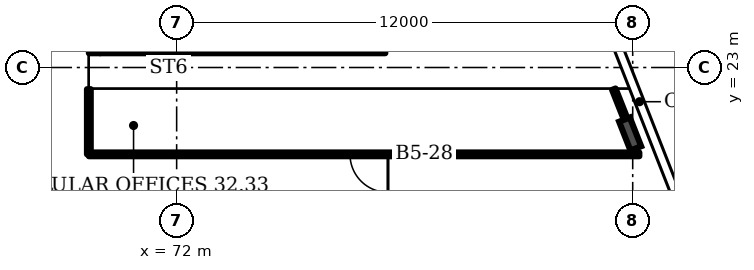
"""IFC4 building model, lengths in metres.
Left out: names, types, materials, properties, quantities, classifications, styles, units other than length and angle.
Written with IfcOpenShell. Run it as: python <this file> out.ifc"""

import sys

from ifc_helpers import new_model, si_unit, direction, frame, frame_2d, origin, origin_2d, place, context, subcontext, project, spatial, rectangle, i_section, extrude, element, fill, save


model = new_model("IFC4")
c1 = context("Model", 3, precision=1e-05, world=origin(), true_north=direction((0.0, 1.0)))
c2 = subcontext(c1, "Body", "Model", "MODEL_VIEW")
j1 = project(units=[si_unit("LENGTHUNIT", "METRE"), si_unit("PLANEANGLEUNIT", "RADIAN")], contexts=[c1])
p1 = place(None, origin())
s1 = spatial("IfcSite", under=j1, at=p1, CompositionType="ELEMENT")
p2 = place(p1, origin())
s2 = spatial("IfcBuilding", under=s1, at=p2, CompositionType="ELEMENT")
p3 = place(p2, frame((0.0, 0.0, 136.3)))
s3 = spatial("IfcBuildingStorey", under=s2, at=p3, CompositionType="ELEMENT", Elevation=136.3)
p4 = place(p3, frame((83.933, 21.251, 0.0), z_axis=(0.0, 0.0, 1.0), x_axis=(0.930702, 0.365778, 0.0)))
e1 = element("IfcColumn", 1, at=p4, inside=s3, PredefinedType="COLUMN", context=c2, shape_type="SweptSolid", body=[
    extrude(i_section(OverallWidth=0.303, OverallDepth=0.814, WebThickness=0.021, FlangeThickness=0.04, FilletRadius=0.03, at=origin_2d()), origin(), (0.0, 0.0, 1.0), 3.6),
])
p5 = place(p3, frame((69.84, 23.375, 0.0), z_axis=(0.0, 0.0, 1.0), x_axis=(0.0, 1.0, 0.0)))
e2 = element("IfcWall", 2, at=p5, inside=s3, PredefinedType="SHEAR", context=c2, shape_type="SweptSolid", body=[
    extrude(rectangle(XDim=4.35, YDim=0.3, at=frame_2d((2.175, 0.0))), origin(), (0.0, 0.0, 1.0), 3.2),
])
p6 = place(p5, frame((1.575, 0.0, 0.0)))
e3 = element("IfcOpeningElement", 3, at=p6, cuts=e2, PredefinedType="OPENING", context=c2, shape_type="SweptSolid", body=[
    extrude(rectangle(XDim=1.2, YDim=2.1, at=frame_2d((0.6, 1.05))), frame((0.0, 0.16, 0.0), z_axis=(0.0, -1.0, 0.0), x_axis=(1.0, 0.0, 0.0)), (0.0, 0.0, 1.0), 0.32),
])
p7 = place(p3, frame((69.69, 20.715, 0.0), z_axis=(0.0, 0.0, 1.0), x_axis=(0.0, 1.0, 0.0)))
e4 = element("IfcWall", 4, at=p7, inside=s3, PredefinedType="PARTITIONING", context=c2, shape_type="SweptSolid", body=[
    extrude(rectangle(XDim=1.715, YDim=0.1, at=frame_2d((0.857, 0.0))), origin(), (0.0, 0.0, 1.0), 3.2),
])
p8 = place(p3, frame((69.69, 20.715, 0.0), z_axis=(0.0, 0.0, 1.0), x_axis=(1.0, 0.0, 0.0)))
e5 = element("IfcWall", 5, at=p8, inside=s3, PredefinedType="PARTITIONING", context=c2, shape_type="SweptSolid", body=[
    extrude(rectangle(XDim=14.485, YDim=0.1, at=frame_2d((7.243, 0.0))), origin(), (0.0, 0.0, 1.0), 3.2),
])
p9 = place(p8, frame((6.871, 0.0, 0.0)))
e6 = element("IfcOpeningElement", 6, at=p9, cuts=e5, PredefinedType="OPENING", context=c2, shape_type="SweptSolid", body=[
    extrude(rectangle(XDim=1.0, YDim=2.1, at=frame_2d((0.5, 1.05))), frame((0.0, 0.06, 0.0), z_axis=(0.0, -1.0, 0.0), x_axis=(1.0, 0.0, 0.0)), (0.0, 0.0, 1.0), 0.12),
])
p10 = place(p3, frame((83.78, 21.73, 0.0), z_axis=(0.0, 0.0, 1.0), x_axis=(-0.368088, 0.929787, 0.0)))
e7 = element("IfcWall", 7, at=p10, inside=s3, PredefinedType="PARTITIONING", context=c2, shape_type="SweptSolid", body=[
    extrude(rectangle(XDim=0.753, YDim=0.1, at=frame_2d((0.376, 0.0))), origin(), (0.0, 0.0, 1.0), 2.58),
])
p11 = place(p3, frame((69.99, 23.525, 0.0), z_axis=(0.0, 0.0, 1.0), x_axis=(1.0, 0.0, 0.0)))
e8 = element("IfcWall", 8, at=p11, inside=s3, PredefinedType="SHEAR", context=c2, shape_type="SweptSolid", body=[
    extrude(rectangle(XDim=7.5, YDim=0.3, at=frame_2d((3.75, 0.0))), origin(), (0.0, 0.0, 1.0), 3.2),
])
p12 = place(p9, origin())
e9 = element("IfcDoor", 9, at=p12, inside=s3, OperationType="SINGLE_SWING_RIGHT", PredefinedType="DOOR", context=c2, shape_type="SweptSolid", body=[
    extrude(rectangle(XDim=1.0, YDim=2.1, at=frame_2d((0.5, 1.05))), frame((0.0, 0.025, 0.0), z_axis=(0.0, -1.0, 0.0), x_axis=(1.0, 0.0, 0.0)), (0.0, 0.0, 1.0), 0.05),
])
fill(e6, e9)
save(model, sys.argv[1])
